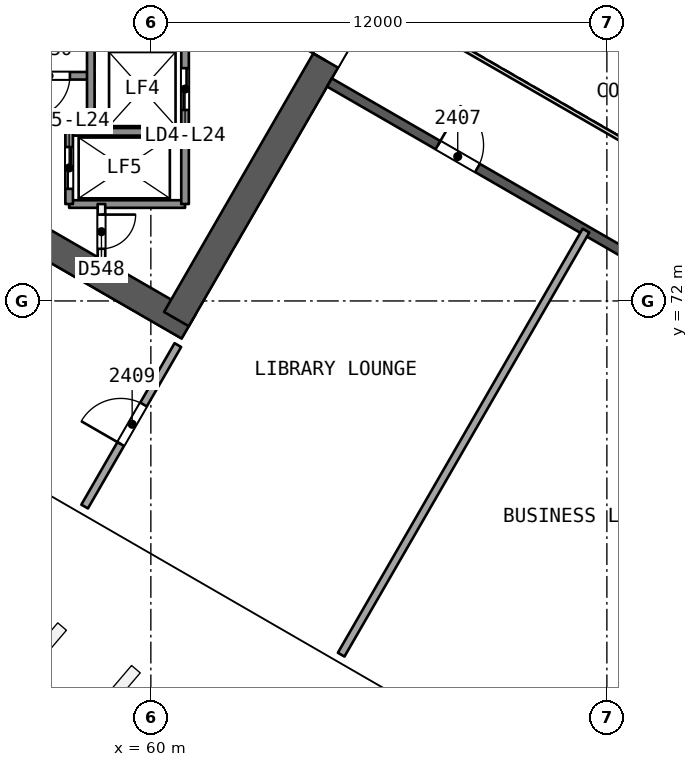
"""IFC4 building model, lengths in metres.
Left out: names, types, materials, properties, quantities, classifications, styles, units other than length and angle.
Written with IfcOpenShell. Run it as: python <this file> out.ifc"""

import sys

from ifc_helpers import new_model, si_unit, direction, frame, frame_2d, origin, place, context, subcontext, project, spatial, rectangle, extrude, element, fill, save


model = new_model("IFC4")
c1 = context("Model", 3, precision=1e-05, world=origin(), true_north=direction((0.0, 1.0)))
c2 = subcontext(c1, "Body", "Model", "MODEL_VIEW")
j1 = project(units=[si_unit("LENGTHUNIT", "METRE"), si_unit("PLANEANGLEUNIT", "RADIAN")], contexts=[c1])
p1 = place(None, origin())
s1 = spatial("IfcSite", under=j1, at=p1, CompositionType="ELEMENT")
p2 = place(p1, origin())
s2 = spatial("IfcBuilding", under=s1, at=p2, CompositionType="ELEMENT")
p3 = place(p2, frame((0.0, 0.0, 102.4)))
s3 = spatial("IfcBuildingStorey", under=s2, at=p3, CompositionType="ELEMENT", Elevation=102.4)
p4 = place(p3, frame((48.772, 78.394, 0.0), z_axis=(0.0, 0.0, 1.0), x_axis=(0.866028339916, -0.499994914436, 0.0)))
e1 = element("IfcWall", 1, at=p4, inside=s3, PredefinedType="SHEAR", context=c2, shape_type="SweptSolid", body=[
    extrude(rectangle(XDim=14.117, YDim=0.75, at=frame_2d((7.059, 0.0))), origin(), (0.0, 0.0, 1.0), 4.4),
])
p5 = place(p3, frame((60.673, 71.523, 0.0), z_axis=(0.0, 0.0, 1.0), x_axis=(0.499997052475, 0.866027105532, 0.0)))
e2 = element("IfcWall", 2, at=p5, inside=s3, PredefinedType="SHEAR", context=c2, shape_type="SweptSolid", body=[
    extrude(rectangle(XDim=10.005, YDim=0.75, at=frame_2d((5.002, 0.0))), origin(), (0.0, 0.0, 1.0), 4.4),
])
p6 = place(p5, frame((7.855, 0.0, 0.0)))
e3 = element("IfcOpeningElement", 3, at=p6, cuts=e2, PredefinedType="OPENING", context=c2, shape_type="SweptSolid", body=[
    extrude(rectangle(XDim=1.2, YDim=2.1, at=frame_2d((0.6, 1.05))), frame((0.0, 0.385, 0.0), z_axis=(0.0, -1.0, 0.0), x_axis=(1.0, 0.0, 0.0)), (0.0, 0.0, 1.0), 0.771),
])
p7 = place(p3, frame((64.7, 77.748, 0.0), z_axis=(0.0, 0.0, 1.0), x_axis=(0.866026492143, -0.499998114903, 0.0)))
e4 = element("IfcWall", 4, at=p7, inside=s3, PredefinedType="SHEAR", context=c2, shape_type="SweptSolid", body=[
    extrude(rectangle(XDim=15.588, YDim=0.25, at=frame_2d((7.794, 0.0))), origin(), (0.0, 0.0, 1.0), 3.95),
])
p8 = place(p7, frame((3.297, 0.0, 0.0)))
e5 = element("IfcOpeningElement", 5, at=p8, cuts=e4, PredefinedType="OPENING", context=c2, shape_type="SweptSolid", body=[
    extrude(rectangle(XDim=1.2, YDim=2.4, at=frame_2d((0.6, 1.2))), frame((0.0, 0.135, 0.0), z_axis=(0.0, -1.0, 0.0), x_axis=(1.0, 0.0, 0.0)), (0.0, 0.0, 1.0), 0.271),
])
p9 = place(p7, frame((11.091, 0.0, 0.0)))
e6 = element("IfcOpeningElement", 6, at=p9, cuts=e4, PredefinedType="OPENING", context=c2, shape_type="SweptSolid", body=[
    extrude(rectangle(XDim=1.2, YDim=2.4, at=frame_2d((0.6, 1.2))), frame((0.0, 0.135, 0.0), z_axis=(0.0, -1.0, 0.0), x_axis=(1.0, 0.0, 0.0)), (0.0, 0.0, 1.0), 0.271),
])
p10 = place(p3, frame((65.008, 62.693, 0.0), z_axis=(0.0, 0.0, 1.0), x_axis=(0.499996920331, 0.866027181825, 0.0)))
e7 = element("IfcWall", 7, at=p10, inside=s3, PredefinedType="PARTITIONING", context=c2, shape_type="SweptSolid", body=[
    extrude(rectangle(XDim=12.884, YDim=0.2, at=frame_2d((6.442, 0.0))), origin(), (0.0, 0.0, 1.0), 3.95),
])
p11 = place(p3, frame((58.258, 66.59, 0.0), z_axis=(0.0, 0.0, 1.0), x_axis=(0.499982380289, 0.86603557629, 0.0)))
e8 = element("IfcWall", 8, at=p11, inside=s3, PredefinedType="PARTITIONING", context=c2, shape_type="SweptSolid", body=[
    extrude(rectangle(XDim=4.906, YDim=0.2, at=frame_2d((2.453, 0.0))), origin(), (0.0, 0.0, 1.0), 3.95),
])
p12 = place(p11, frame((1.9, 0.0, 0.0)))
e9 = element("IfcOpeningElement", 9, at=p12, cuts=e8, PredefinedType="OPENING", context=c2, shape_type="SweptSolid", body=[
    extrude(rectangle(XDim=1.2, YDim=2.4, at=frame_2d((0.6, 1.2))), frame((0.0, 0.11, 0.0), z_axis=(0.0, -1.0, 0.0), x_axis=(1.0, 0.0, 0.0)), (0.0, 0.0, 1.0), 0.221),
])
p13 = place(p3, frame((74.21, 63.044, 0.0), z_axis=(0.0, 0.0, 1.0), x_axis=(-0.499982380289, -0.86603557629, 0.0)))
e10 = element("IfcWall", 10, at=p13, inside=s3, PredefinedType="PARTITIONING", context=c2, shape_type="SweptSolid", body=[
    extrude(rectangle(XDim=4.906, YDim=0.2, at=frame_2d((2.453, 0.0))), origin(), (0.0, 0.0, 1.0), 3.95),
])
p14 = place(p3, frame((58.42, 77.925, 0.0), z_axis=(0.0, 0.0, 1.0), x_axis=(-1.0, 0.0, 0.0)))
e11 = element("IfcWall", 11, at=p14, inside=s3, PredefinedType="SOLIDWALL", context=c2, shape_type="SweptSolid", body=[
    extrude(rectangle(XDim=7.7, YDim=0.2, at=frame_2d((3.85, 0.0))), origin(), (0.0, 0.0, 1.0), 3.95),
])
p15 = place(p14, frame((0.55, 0.0, 0.0)))
e12 = element("IfcOpeningElement", 12, at=p15, cuts=e11, PredefinedType="OPENING", context=c2, shape_type="SweptSolid", body=[
    extrude(rectangle(XDim=1.1, YDim=2.1, at=frame_2d((0.55, 1.05))), frame((0.0, 0.11, 0.0), z_axis=(0.0, -1.0, 0.0), x_axis=(1.0, 0.0, 0.0)), (0.0, 0.0, 1.0), 0.221),
])
for number, where, z_axis, x_axis in (
    (13, (60.9, 76.45, 0.0), (0.0, 0.0, 1.0), (-1.0, 0.0, 0.0)),
    (14, (60.9, 74.55, 0.0), (0.0, 0.0, 1.0), (-1.0, 0.0, 0.0)),
):
    element("IfcWall", number, at=place(p3, frame(where, z_axis=z_axis, x_axis=x_axis)), inside=s3, PredefinedType="SOLIDWALL", context=c2, shape_type="SweptSolid", body=[
        extrude(rectangle(XDim=3.05, YDim=0.2, at=frame_2d((1.525, 0.0))), origin(), (0.0, 0.0, 1.0), 3.95),
    ])
p16 = place(p3, frame((60.9, 85.45, 0.0), z_axis=(0.0, 0.0, 1.0), x_axis=(0.0, -1.0, 0.0)))
e15 = element("IfcWall", 15, at=p16, inside=s3, PredefinedType="SOLIDWALL", context=c2, shape_type="SweptSolid", body=[
    extrude(rectangle(XDim=10.9, YDim=0.2, at=frame_2d((5.45, 0.0))), origin(), (0.0, 0.0, 1.0), 3.95),
])
p17 = place(p16, frame((0.575, 0.0, 0.0)))
e16 = element("IfcOpeningElement", 16, at=p17, cuts=e15, PredefinedType="OPENING", context=c2, shape_type="SweptSolid", body=[
    extrude(rectangle(XDim=1.1, YDim=2.1, at=frame_2d((0.55, 1.05))), frame((0.0, 0.11, 0.0), z_axis=(0.0, -1.0, 0.0), x_axis=(1.0, 0.0, 0.0)), (0.0, 0.0, 1.0), 0.221),
])
p18 = place(p16, frame((2.825, 0.0, 0.0)))
e17 = element("IfcOpeningElement", 17, at=p18, cuts=e15, PredefinedType="OPENING", context=c2, shape_type="SweptSolid", body=[
    extrude(rectangle(XDim=1.1, YDim=2.1, at=frame_2d((0.55, 1.05))), frame((0.0, 0.11, 0.0), z_axis=(0.0, -1.0, 0.0), x_axis=(1.0, 0.0, 0.0)), (0.0, 0.0, 1.0), 0.221),
])
p19 = place(p16, frame((5.075, 0.0, 0.0)))
e18 = element("IfcOpeningElement", 18, at=p19, cuts=e15, PredefinedType="OPENING", context=c2, shape_type="SweptSolid", body=[
    extrude(rectangle(XDim=1.1, YDim=2.1, at=frame_2d((0.55, 1.05))), frame((0.0, 0.11, 0.0), z_axis=(0.0, -1.0, 0.0), x_axis=(1.0, 0.0, 0.0)), (0.0, 0.0, 1.0), 0.221),
])
p20 = place(p16, frame((7.325, 0.0, 0.0)))
e19 = element("IfcOpeningElement", 19, at=p20, cuts=e15, PredefinedType="OPENING", context=c2, shape_type="SweptSolid", body=[
    extrude(rectangle(XDim=1.1, YDim=2.1, at=frame_2d((0.55, 1.05))), frame((0.0, 0.11, 0.0), z_axis=(0.0, -1.0, 0.0), x_axis=(1.0, 0.0, 0.0)), (0.0, 0.0, 1.0), 0.221),
])
p21 = place(p3, frame((58.7, 74.55, 0.0), z_axis=(0.0, 0.0, 1.0), x_axis=(0.0, -1.0, 0.0)))
e20 = element("IfcWall", 20, at=p21, inside=s3, PredefinedType="PARTITIONING", context=c2, shape_type="SweptSolid", body=[
    extrude(rectangle(XDim=1.455, YDim=0.2, at=frame_2d((0.728, 0.0))), origin(), (0.0, 0.0, 1.0), 3.95),
])
p22 = place(p21, frame((0.278, 0.0, 0.0)))
e21 = element("IfcOpeningElement", 21, at=p22, cuts=e20, PredefinedType="OPENING", context=c2, shape_type="SweptSolid", body=[
    extrude(rectangle(XDim=0.9, YDim=2.1, at=frame_2d((0.45, 1.05))), frame((0.0, 0.11, 0.0), z_axis=(0.0, -1.0, 0.0), x_axis=(1.0, 0.0, 0.0)), (0.0, 0.0, 1.0), 0.221),
])
p23 = place(p3, frame((58.42, 85.45, 0.0), z_axis=(0.0, 0.0, 1.0), x_axis=(0.0, -1.0, 0.0)))
e22 = element("IfcWall", 22, at=p23, inside=s3, PredefinedType="SOLIDWALL", context=c2, shape_type="SweptSolid", body=[
    extrude(rectangle(XDim=9.0, YDim=0.2, at=frame_2d((4.5, 0.0))), origin(), (0.0, 0.0, 1.0), 3.95),
])
p24 = place(p3, frame((57.85, 76.45, 0.0), z_axis=(0.0, 0.0, 1.0), x_axis=(0.0, -1.0, 0.0)))
e23 = element("IfcWall", 23, at=p24, inside=s3, PredefinedType="SOLIDWALL", context=c2, shape_type="SweptSolid", body=[
    extrude(rectangle(XDim=1.9, YDim=0.2, at=frame_2d((0.95, 0.0))), origin(), (0.0, 0.0, 1.0), 3.95),
])
p25 = place(p24, frame((0.4, 0.0, 0.0)))
e24 = element("IfcOpeningElement", 24, at=p25, cuts=e23, PredefinedType="OPENING", context=c2, shape_type="SweptSolid", body=[
    extrude(rectangle(XDim=1.1, YDim=2.1, at=frame_2d((0.55, 1.05))), frame((0.0, 0.11, 0.0), z_axis=(0.0, -1.0, 0.0), x_axis=(1.0, 0.0, 0.0)), (0.0, 0.0, 1.0), 0.221),
])
p26 = place(p3, frame((67.702, 78.948, 0.0), z_axis=(0.0, 0.0, 1.0), x_axis=(0.866026658274, -0.499997827154, 0.0)))
e25 = element("IfcWall", 25, at=p26, inside=s3, PredefinedType="PARTITIONING", context=c2, shape_type="SweptSolid", body=[
    extrude(rectangle(XDim=11.588, YDim=0.1, at=frame_2d((5.794, 0.0))), origin(), (0.0, 0.0, 1.0), 3.95),
])
p27 = place(p8, origin())
e26 = element("IfcDoor", 26, at=p27, inside=s3, OperationType="SINGLE_SWING_LEFT", PredefinedType="NOTDEFINED", context=c2, shape_type="SweptSolid", body=[
    extrude(rectangle(XDim=1.2, YDim=2.4, at=frame_2d((0.6, 1.2))), frame((0.0, 0.025, 0.0), z_axis=(0.0, -1.0, 0.0), x_axis=(1.0, 0.0, 0.0)), (0.0, 0.0, 1.0), 0.05),
])
fill(e5, e26)
p28 = place(p12, origin())
e27 = element("IfcDoor", 27, at=p28, inside=s3, OperationType="SINGLE_SWING_LEFT", PredefinedType="NOTDEFINED", context=c2, shape_type="SweptSolid", body=[
    extrude(rectangle(XDim=1.2, YDim=2.4, at=frame_2d((0.6, 1.2))), frame((0.0, 0.025, 0.0), z_axis=(0.0, -1.0, 0.0), x_axis=(1.0, 0.0, 0.0)), (0.0, 0.0, 1.0), 0.05),
])
fill(e9, e27)
p29 = place(p6, origin())
e28 = element("IfcDoor", 28, at=p29, inside=s3, OperationType="SINGLE_SWING_LEFT", PredefinedType="NOTDEFINED", context=c2, shape_type="SweptSolid", body=[
    extrude(rectangle(XDim=1.2, YDim=2.1, at=frame_2d((0.6, 1.05))), frame((0.0, 0.025, 0.0), z_axis=(0.0, -1.0, 0.0), x_axis=(1.0, 0.0, 0.0)), (0.0, 0.0, 1.0), 0.05),
])
fill(e3, e28)
p30 = place(p20, origin())
e29 = element("IfcDoor", 29, at=p30, inside=s3, OperationType="SLIDING_TO_LEFT", PredefinedType="NOTDEFINED", context=c2, shape_type="SweptSolid", body=[
    extrude(rectangle(XDim=1.1, YDim=2.1, at=frame_2d((0.55, 1.05))), frame((0.0, 0.025, 0.0), z_axis=(0.0, -1.0, 0.0), x_axis=(1.0, 0.0, 0.0)), (0.0, 0.0, 1.0), 0.05),
])
fill(e19, e29)
p31 = place(p25, origin())
e30 = element("IfcDoor", 30, at=p31, inside=s3, OperationType="SLIDING_TO_RIGHT", PredefinedType="NOTDEFINED", context=c2, shape_type="SweptSolid", body=[
    extrude(rectangle(XDim=1.1, YDim=2.1, at=frame_2d((0.55, 1.05))), frame((0.0, 0.025, 0.0), z_axis=(0.0, -1.0, 0.0), x_axis=(1.0, 0.0, 0.0)), (0.0, 0.0, 1.0), 0.05),
])
fill(e24, e30)
p32 = place(p22, origin())
e31 = element("IfcDoor", 31, at=p32, inside=s3, OperationType="SINGLE_SWING_LEFT", PredefinedType="NOTDEFINED", context=c2, shape_type="SweptSolid", body=[
    extrude(rectangle(XDim=0.9, YDim=2.1, at=frame_2d((0.45, 1.05))), frame((0.0, 0.025, 0.0), z_axis=(0.0, -1.0, 0.0), x_axis=(1.0, 0.0, 0.0)), (0.0, 0.0, 1.0), 0.05),
])
fill(e21, e31)
p33 = place(p15, origin())
e32 = element("IfcDoor", 32, at=p33, inside=s3, OperationType="SINGLE_SWING_RIGHT", PredefinedType="NOTDEFINED", context=c2, shape_type="SweptSolid", body=[
    extrude(rectangle(XDim=1.1, YDim=2.1, at=frame_2d((0.55, 1.05))), frame((0.0, 0.025, 0.0), z_axis=(0.0, -1.0, 0.0), x_axis=(1.0, 0.0, 0.0)), (0.0, 0.0, 1.0), 0.05),
])
fill(e12, e32)
save(model, sys.argv[1])
